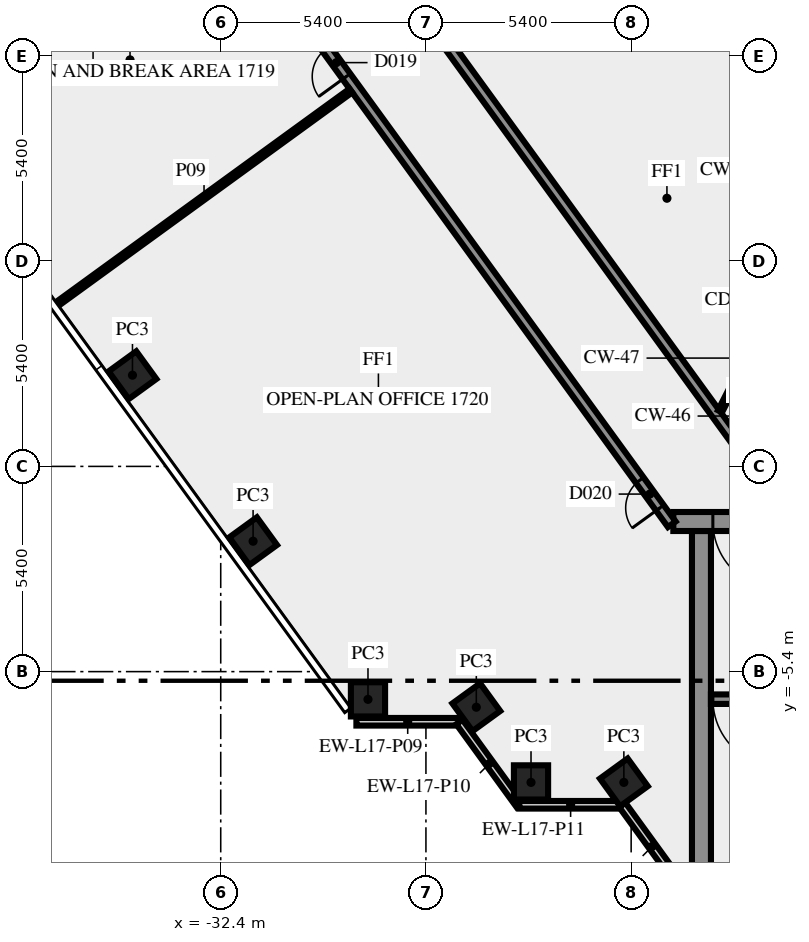
"""IFC4 building model, lengths in metres.
Left out: names, types, materials, properties, quantities, classifications, styles, units other than length and angle.
Written with IfcOpenShell. Run it as: python <this file> out.ifc"""

import sys

from ifc_helpers import new_model, si_unit, direction, frame, frame_2d, origin, origin_2d, place, context, subcontext, project, spatial, rectangle, extrude, element, fill, save


model = new_model("IFC4")
c1 = context("Model", 3, precision=1e-05, world=origin(), true_north=direction((0.0, 1.0)))
c2 = subcontext(c1, "Body", "Model", "MODEL_VIEW")
j1 = project(units=[si_unit("LENGTHUNIT", "METRE"), si_unit("PLANEANGLEUNIT", "RADIAN")], contexts=[c1])
p1 = place(None, origin())
s1 = spatial("IfcSite", under=j1, at=p1, CompositionType="ELEMENT")
p2 = place(p1, origin())
s2 = spatial("IfcBuilding", under=s1, at=p2, CompositionType="ELEMENT")
p3 = place(p2, frame((0.0, 0.0, 75.0)))
s3 = spatial("IfcBuildingStorey", under=s2, at=p3, CompositionType="ELEMENT", Elevation=75.0)
for number, where, z_axis, x_axis in (
    (1, (-34.722, 2.4, 0.0), (0.0, 0.0, 1.0), (0.588, -0.809, 0.0)),
    (2, (-31.548, -1.969, 0.0), (0.0, 0.0, 1.0), (0.588, -0.809, 0.0)),
    (3, (-28.525, -6.13, 0.0), (0.0, 0.0, 1.0), (1.0, 0.0, 0.0)),
    (4, (-25.674, -6.337, 0.0), (0.0, 0.0, 1.0), (0.588, -0.809, 0.0)),
    (5, (-24.235, -8.315, 0.0), (0.0, 0.0, 1.0), (1.0, 0.0, 0.0)),
    (6, (-21.792, -8.315, 0.0), (0.0, 0.0, 1.0), (0.588, -0.809, 0.0)),
):
    element("IfcColumn", number, at=place(p3, frame(where, z_axis=z_axis, x_axis=x_axis)), inside=s3, PredefinedType="COLUMN", context=c2, shape_type="SweptSolid", body=[
        extrude(rectangle(XDim=0.9, YDim=0.9, at=origin_2d()), origin(), (0.0, 0.0, 1.0), 3.4),
    ])
p4 = place(p3, frame((-28.83, -6.719, 0.0), z_axis=(0.0, 0.0, 1.0), x_axis=(1.0, 0.0, 0.0)))
e7 = element("IfcWall", 7, at=p4, inside=s3, PredefinedType="SOLIDWALL", context=c2, shape_type="SweptSolid", body=[
    extrude(rectangle(XDim=2.7, YDim=0.2, at=frame_2d((1.35, 0.0))), origin(), (0.0, 0.0, 1.0), 3.4),
])
p5 = place(p3, frame((-26.12, -6.724, 0.0), z_axis=(0.0, 0.0, 1.0), x_axis=(0.587720002413, -0.809064397168, 0.0)))
e8 = element("IfcWall", 8, at=p5, inside=s3, PredefinedType="SOLIDWALL", context=c2, shape_type="SweptSolid", body=[
    extrude(rectangle(XDim=2.7, YDim=0.2, at=frame_2d((1.35, 0.0))), origin(), (0.0, 0.0, 1.0), 3.4),
])
p6 = place(p3, frame((-24.543, -8.904, 0.0), z_axis=(0.0, 0.0, 1.0), x_axis=(1.0, 0.0, 0.0)))
e9 = element("IfcWall", 9, at=p6, inside=s3, PredefinedType="SOLIDWALL", context=c2, shape_type="SweptSolid", body=[
    extrude(rectangle(XDim=2.7, YDim=0.2, at=frame_2d((1.35, 0.0))), origin(), (0.0, 0.0, 1.0), 3.4),
])
p7 = place(p3, frame((-21.833, -8.909, 0.0), z_axis=(0.0, 0.0, 1.0), x_axis=(0.587766567315, -0.809030569476, 0.0)))
e10 = element("IfcWall", 10, at=p7, inside=s3, PredefinedType="SOLIDWALL", context=c2, shape_type="SweptSolid", body=[
    extrude(rectangle(XDim=2.688, YDim=0.2, at=frame_2d((1.344, 0.0))), origin(), (0.0, 0.0, 1.0), 3.4),
])
p8 = place(p3, frame((-19.75, -10.5, 0.0), z_axis=(0.0, 0.0, 1.0), x_axis=(0.0, 1.0, 0.0)))
e11 = element("IfcWall", 11, at=p8, inside=s3, PredefinedType="SHEAR", context=c2, shape_type="SweptSolid", body=[
    extrude(rectangle(XDim=8.8, YDim=0.5, at=frame_2d((4.4, 0.0))), origin(), (0.0, 0.0, 1.0), 3.4),
])
p9 = place(p3, frame((-11.45, -6.125, 0.0), z_axis=(0.0, 0.0, 1.0), x_axis=(-1.0, 0.0, 0.0)))
e12 = element("IfcWall", 12, at=p9, inside=s3, PredefinedType="SHEAR", context=c2, shape_type="SweptSolid", body=[
    extrude(rectangle(XDim=8.05, YDim=0.25, at=frame_2d((4.025, 0.0))), origin(), (0.0, 0.0, 1.0), 3.4),
])
p10 = place(p9, frame((6.2, 0.0, 0.0)))
e13 = element("IfcOpeningElement", 13, at=p10, cuts=e12, PredefinedType="OPENING", context=c2, shape_type="SweptSolid", body=[
    extrude(rectangle(XDim=1.8, YDim=2.1, at=frame_2d((0.9, 1.05))), frame((0.0, 0.135, 0.0), z_axis=(0.0, -1.0, 0.0), x_axis=(1.0, 0.0, 0.0)), (0.0, 0.0, 1.0), 0.27),
])
p11 = place(p3, frame((20.49, -1.45, 0.0), z_axis=(0.0, 0.0, 1.0), x_axis=(-1.0, 0.0, 0.0)))
e14 = element("IfcWall", 14, at=p11, inside=s3, PredefinedType="SHEAR", context=c2, shape_type="SweptSolid", body=[
    extrude(rectangle(XDim=40.98, YDim=0.5, at=frame_2d((20.49, 0.0))), origin(), (0.0, 0.0, 1.0), 3.4),
])
p12 = place(p11, frame((38.14, 0.0, 0.0)))
e15 = element("IfcOpeningElement", 15, at=p12, cuts=e14, PredefinedType="OPENING", context=c2, shape_type="SweptSolid", body=[
    extrude(rectangle(XDim=1.8, YDim=2.1, at=frame_2d((0.9, 1.05))), frame((0.0, 0.26, 0.0), z_axis=(0.0, -1.0, 0.0), x_axis=(1.0, 0.0, 0.0)), (0.0, 0.0, 1.0), 0.52),
])
p13 = place(p11, frame((35.89, 0.0, 0.0)))
e16 = element("IfcOpeningElement", 16, at=p13, cuts=e14, PredefinedType="OPENING", context=c2, shape_type="SweptSolid", body=[
    extrude(rectangle(XDim=0.9, YDim=2.1, at=frame_2d((0.45, 1.05))), frame((0.0, 0.26, 0.0), z_axis=(0.0, -1.0, 0.0), x_axis=(1.0, 0.0, 0.0)), (0.0, 0.0, 1.0), 0.52),
])
p14 = place(p11, frame((32.94, 0.0, 0.0)))
e17 = element("IfcOpeningElement", 17, at=p14, cuts=e14, PredefinedType="OPENING", context=c2, shape_type="SweptSolid", body=[
    extrude(rectangle(XDim=0.9, YDim=2.1, at=frame_2d((0.45, 1.05))), frame((0.0, 0.26, 0.0), z_axis=(0.0, -1.0, 0.0), x_axis=(1.0, 0.0, 0.0)), (0.0, 0.0, 1.0), 0.52),
])
p15 = place(p11, frame((21.765, 0.0, 0.0)))
e18 = element("IfcOpeningElement", 18, at=p15, cuts=e14, PredefinedType="OPENING", context=c2, shape_type="SweptSolid", body=[
    extrude(rectangle(XDim=2.0, YDim=2.1, at=frame_2d((1.0, 1.05))), frame((0.0, 0.26, 0.0), z_axis=(0.0, -1.0, 0.0), x_axis=(1.0, 0.0, 0.0)), (0.0, 0.0, 1.0), 0.52),
])
p16 = place(p11, frame((7.14, 0.0, 0.0)))
e19 = element("IfcOpeningElement", 19, at=p16, cuts=e14, PredefinedType="OPENING", context=c2, shape_type="SweptSolid", body=[
    extrude(rectangle(XDim=0.9, YDim=2.1, at=frame_2d((0.45, 1.05))), frame((0.0, 0.26, 0.0), z_axis=(0.0, -1.0, 0.0), x_axis=(1.0, 0.0, 0.0)), (0.0, 0.0, 1.0), 0.52),
])
p17 = place(p11, frame((5.028, 0.0, 0.0)))
e20 = element("IfcOpeningElement", 20, at=p17, cuts=e14, PredefinedType="OPENING", context=c2, shape_type="SweptSolid", body=[
    extrude(rectangle(XDim=0.8, YDim=2.1, at=frame_2d((0.4, 1.05))), frame((0.0, 0.26, 0.0), z_axis=(0.0, -1.0, 0.0), x_axis=(1.0, 0.0, 0.0)), (0.0, 0.0, 1.0), 0.52),
])
p18 = place(p11, frame((3.452, 0.0, 0.0)))
e21 = element("IfcOpeningElement", 21, at=p18, cuts=e14, PredefinedType="OPENING", context=c2, shape_type="SweptSolid", body=[
    extrude(rectangle(XDim=0.8, YDim=2.1, at=frame_2d((0.4, 1.05))), frame((0.0, 0.26, 0.0), z_axis=(0.0, -1.0, 0.0), x_axis=(1.0, 0.0, 0.0)), (0.0, 0.0, 1.0), 0.52),
])
p19 = place(p11, frame((1.04, 0.0, 0.0)))
e22 = element("IfcOpeningElement", 22, at=p19, cuts=e14, PredefinedType="OPENING", context=c2, shape_type="SweptSolid", body=[
    extrude(rectangle(XDim=1.8, YDim=2.1, at=frame_2d((0.9, 1.05))), frame((0.0, 0.26, 0.0), z_axis=(0.0, -1.0, 0.0), x_axis=(1.0, 0.0, 0.0)), (0.0, 0.0, 1.0), 0.52),
])
p20 = place(p3, frame((-20.531, -1.523, 0.0), z_axis=(0.0, 0.0, 1.0), x_axis=(-0.587784593204, 0.809017473231, 0.0)))
e23 = element("IfcWall", 23, at=p20, inside=s3, PredefinedType="SOLIDWALL", context=c2, shape_type="SweptSolid", body=[
    extrude(rectangle(XDim=44.67, YDim=0.25, at=frame_2d((22.335, 0.0))), origin(), (0.0, 0.0, 1.0), 3.4),
])
p21 = place(p20, frame((0.533, 0.0, 0.0)))
e24 = element("IfcOpeningElement", 24, at=p21, cuts=e23, PredefinedType="OPENING", context=c2, shape_type="SweptSolid", body=[
    extrude(rectangle(XDim=0.9, YDim=2.1, at=frame_2d((0.45, 1.05))), frame((0.0, 0.135, 0.0), z_axis=(0.0, -1.0, 0.0), x_axis=(1.0, 0.0, 0.0)), (0.0, 0.0, 1.0), 0.27),
])
p22 = place(p20, frame((32.531, 0.0, 0.0)))
e25 = element("IfcOpeningElement", 25, at=p22, cuts=e23, PredefinedType="OPENING", context=c2, shape_type="SweptSolid", body=[
    extrude(rectangle(XDim=1.8, YDim=2.1, at=frame_2d((0.9, 1.05))), frame((0.0, 0.135, 0.0), z_axis=(0.0, -1.0, 0.0), x_axis=(1.0, 0.0, 0.0)), (0.0, 0.0, 1.0), 0.27),
])
p23 = place(p20, frame((14.566, 0.0, 0.0)))
e26 = element("IfcOpeningElement", 26, at=p23, cuts=e23, PredefinedType="OPENING", context=c2, shape_type="SweptSolid", body=[
    extrude(rectangle(XDim=0.9, YDim=2.1, at=frame_2d((0.45, 1.05))), frame((0.0, 0.135, 0.0), z_axis=(0.0, -1.0, 0.0), x_axis=(1.0, 0.0, 0.0)), (0.0, 0.0, 1.0), 0.27),
])
p24 = place(p3, frame((-37.232, 25.972, 0.0), z_axis=(0.0, 0.0, 1.0), x_axis=(0.587786323093, -0.809016216391, 0.0)))
e27 = element("IfcWall", 27, at=p24, inside=s3, PredefinedType="SOLIDWALL", context=c2, shape_type="SweptSolid", body=[
    extrude(rectangle(XDim=33.493, YDim=0.25, at=frame_2d((16.747, 0.0))), origin(), (0.0, 0.0, 1.0), 3.4),
])
p25 = place(p24, frame((16.435, 0.0, 0.0)))
e28 = element("IfcOpeningElement", 28, at=p25, cuts=e27, PredefinedType="OPENING", context=c2, shape_type="SweptSolid", body=[
    extrude(rectangle(XDim=0.9, YDim=2.1, at=frame_2d((0.45, 1.05))), frame((0.0, 0.135, 0.0), z_axis=(0.0, -1.0, 0.0), x_axis=(1.0, 0.0, 0.0)), (0.0, 0.0, 1.0), 0.27),
])
p26 = place(p24, frame((7.137, 0.0, 0.0)))
e29 = element("IfcOpeningElement", 29, at=p26, cuts=e27, PredefinedType="OPENING", context=c2, shape_type="SweptSolid", body=[
    extrude(rectangle(XDim=1.8, YDim=2.1, at=frame_2d((0.9, 1.05))), frame((0.0, 0.135, 0.0), z_axis=(0.0, -1.0, 0.0), x_axis=(1.0, 0.0, 0.0)), (0.0, 0.0, 1.0), 0.27),
])
p27 = place(p3, frame((-28.976, 9.888, 0.0), z_axis=(0.0, 0.0, 1.0), x_axis=(-0.808998008689, -0.58781138296, 0.0)))
e30 = element("IfcWall", 30, at=p27, inside=s3, PredefinedType="PARTITIONING", context=c2, shape_type="SweptSolid", body=[
    extrude(rectangle(XDim=9.55, YDim=0.12, at=frame_2d((4.775, 0.0))), origin(), (0.0, 0.0, 1.0), 2.5),
])
p28 = place(p3, frame((-19.261, 1.45, 0.0), z_axis=(0.0, 0.0, 1.0), x_axis=(0.453950796792, 0.891026752736, 0.0)))
e31 = element("IfcWall", 31, at=p28, inside=s3, PredefinedType="PARTITIONING", context=c2, shape_type="SweptSolid", body=[
    extrude(rectangle(XDim=2.778, YDim=0.12, at=frame_2d((1.389, 0.0))), origin(), (0.0, 0.0, 1.0), 3.4),
])
p29 = place(p10, origin())
e32 = element("IfcDoor", 32, at=p29, inside=s3, OperationType="DOUBLE_DOOR_SINGLE_SWING", PredefinedType="DOOR", context=c2, shape_type="SweptSolid", body=[
    extrude(rectangle(XDim=1.8, YDim=2.1, at=frame_2d((0.9, 1.05))), frame((0.0, 0.025, 0.0), z_axis=(0.0, -1.0, 0.0), x_axis=(1.0, 0.0, 0.0)), (0.0, 0.0, 1.0), 0.05),
])
fill(e13, e32)
p30 = place(p12, origin())
e33 = element("IfcDoor", 33, at=p30, inside=s3, OperationType="DOUBLE_DOOR_SINGLE_SWING", PredefinedType="DOOR", context=c2, shape_type="SweptSolid", body=[
    extrude(rectangle(XDim=1.8, YDim=2.1, at=frame_2d((0.9, 1.05))), frame((0.0, 0.025, 0.0), z_axis=(0.0, -1.0, 0.0), x_axis=(1.0, 0.0, 0.0)), (0.0, 0.0, 1.0), 0.05),
])
fill(e15, e33)
p31 = place(p21, origin())
e34 = element("IfcDoor", 34, at=p31, inside=s3, OperationType="SINGLE_SWING_LEFT", PredefinedType="DOOR", context=c2, shape_type="SweptSolid", body=[
    extrude(rectangle(XDim=0.9, YDim=2.1, at=frame_2d((0.45, 1.05))), frame((0.0, 0.025, 0.0), z_axis=(0.0, -1.0, 0.0), x_axis=(1.0, 0.0, 0.0)), (0.0, 0.0, 1.0), 0.05),
])
fill(e24, e34)
p32 = place(p23, origin())
e35 = element("IfcDoor", 35, at=p32, inside=s3, OperationType="SINGLE_SWING_LEFT", PredefinedType="DOOR", context=c2, shape_type="SweptSolid", body=[
    extrude(rectangle(XDim=0.9, YDim=2.1, at=frame_2d((0.45, 1.05))), frame((0.0, 0.025, 0.0), z_axis=(0.0, -1.0, 0.0), x_axis=(1.0, 0.0, 0.0)), (0.0, 0.0, 1.0), 0.05),
])
fill(e26, e35)
save(model, sys.argv[1])
